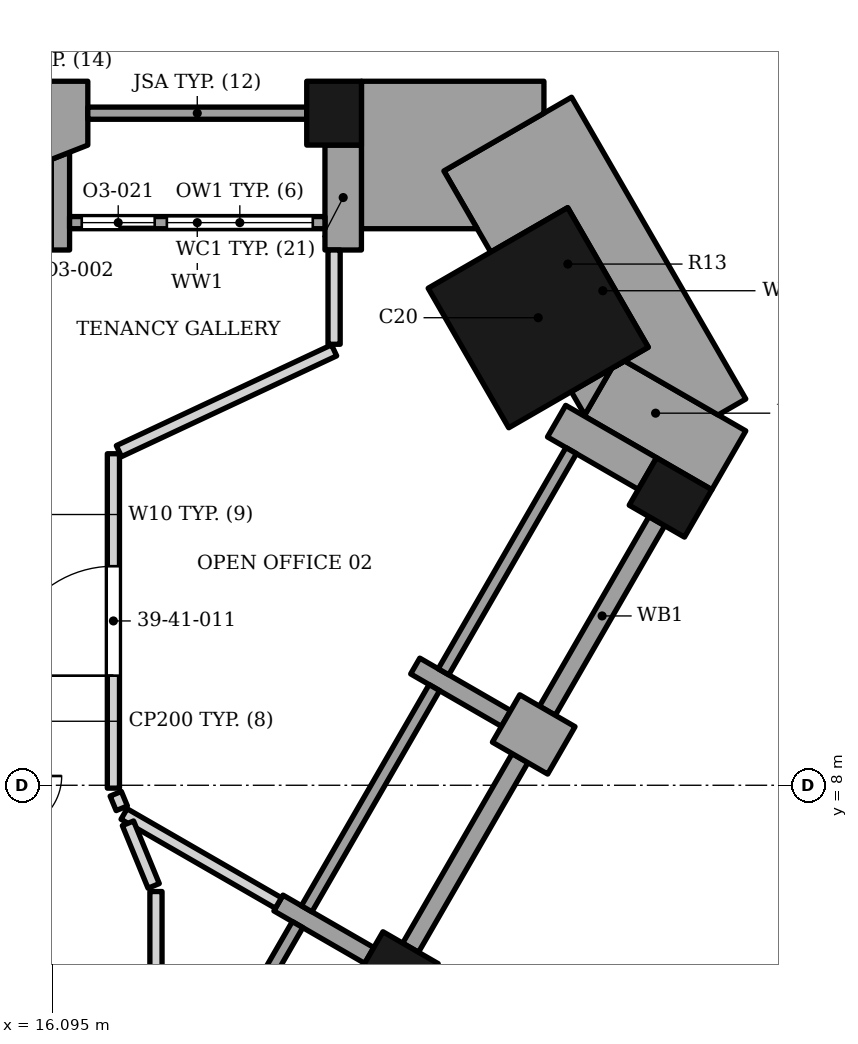
"""IFC4 building model, lengths in metres.
Left out: names, types, materials, properties, quantities, classifications, styles, units other than length and angle.
Written with IfcOpenShell. Run it as: python <this file> out.ifc"""

import sys

from ifc_helpers import new_model, si_unit, direction, frame, frame_2d, origin, origin_2d, place, context, subcontext, project, spatial, polyline, rectangle, outline, extrude, element, fill, save


model = new_model("IFC4")
c1 = context("Model", 3, precision=1e-05, world=origin(), true_north=direction((0.0, 1.0)))
c2 = subcontext(c1, "Body", "Model", "MODEL_VIEW")
j1 = project(units=[si_unit("LENGTHUNIT", "METRE"), si_unit("PLANEANGLEUNIT", "RADIAN")], contexts=[c1])
p1 = place(None, origin())
s1 = spatial("IfcSite", under=j1, at=p1, CompositionType="ELEMENT")
p2 = place(p1, origin())
s2 = spatial("IfcBuilding", under=s1, at=p2, CompositionType="ELEMENT")
p3 = place(p2, frame((0.0, 0.0, 168.0)))
s3 = spatial("IfcBuildingStorey", under=s2, at=p3, CompositionType="ELEMENT", Elevation=168.0)
p4 = place(p3, frame((24.087, 15.689, 0.0), z_axis=(0.0, 0.0, 1.0), x_axis=(-0.866025386331, -0.50000003023, 0.0)))
e1 = element("IfcColumn", 1, at=p4, inside=s3, PredefinedType="COLUMN", context=c2, shape_type="SweptSolid", body=[
    extrude(rectangle(XDim=2.65, YDim=2.65, at=origin_2d()), origin(), (0.0, 0.0, 1.0), 3.9),
])
for number, where, z_axis, x_axis in (
    (2, (21.763, 4.939, 0.0), (0.0, 0.0, 1.0), (0.5, 0.866, 0.0)),
    (3, (26.263, 12.733, 0.0), (0.0, 0.0, 1.0), (0.5, 0.866, 0.0)),
    (4, (20.73, 19.053, 0.0), (0.0, 0.0, 1.0), (-1.0, 0.0, 0.0)),
):
    element("IfcColumn", number, at=place(p3, frame(where, z_axis=z_axis, x_axis=x_axis)), inside=s3, PredefinedType="COLUMN", context=c2, shape_type="SweptSolid", body=[
        extrude(rectangle(XDim=0.9, YDim=1.05, at=origin_2d()), origin(), (0.0, 0.0, 1.0), 3.9),
    ])
p5 = place(p3, frame((19.814, 6.064, 0.0), z_axis=(0.0, 0.0, 1.0), x_axis=(0.866013532718, -0.500020560727, 0.0)))
e5 = element("IfcWall", 5, at=p5, inside=s3, PredefinedType="SOLIDWALL", context=c2, shape_type="SweptSolid", body=[
    extrude(rectangle(XDim=1.725, YDim=0.3, at=frame_2d((0.863, 0.0))), origin(), (0.0, 0.0, 1.0), 2.95),
])
p6 = place(p3, frame((24.468, 8.573, 0.0), z_axis=(0.0, 0.0, 1.0), x_axis=(-0.86592997719, 0.500165247297, 0.0)))
e6 = element("IfcWall", 6, at=p6, inside=s3, PredefinedType="SOLIDWALL", context=c2, shape_type="SweptSolid", body=[
    extrude(rectangle(XDim=1.05, YDim=0.9, at=frame_2d((0.525, 0.0))), origin(), (0.0, 0.0, 1.0), 3.0),
])
p7 = place(p3, frame((23.558, 9.099, 0.0), z_axis=(0.0, 0.0, 1.0), x_axis=(-0.866074815912, 0.499914405916, 0.0)))
e7 = element("IfcWall", 7, at=p7, inside=s3, PredefinedType="SOLIDWALL", context=c2, shape_type="SweptSolid", body=[
    extrude(rectangle(XDim=1.725, YDim=0.3, at=frame_2d((0.862, 0.0))), origin(), (0.0, 0.0, 1.0), 3.0),
])
p8 = place(p3, frame((25.883, 13.125, 0.0), z_axis=(0.0, 0.0, 1.0), x_axis=(-0.866013532718, 0.500020560727, 0.0)))
e8 = element("IfcWall", 8, at=p8, inside=s3, PredefinedType="SOLIDWALL", context=c2, shape_type="SweptSolid", body=[
    extrude(rectangle(XDim=1.725, YDim=0.6, at=frame_2d((0.863, 0.0))), origin(), (0.0, 0.0, 1.0), 3.0),
])
p9 = place(p3, frame((18.029, 2.072, 0.0), z_axis=(0.0, 0.0, 1.0), x_axis=(0.500027713859, 0.866009402589, 0.0)))
e9 = element("IfcWall", 9, at=p9, inside=s3, PredefinedType="ELEMENTEDWALL", context=c2, shape_type="SweptSolid", body=[
    extrude(rectangle(XDim=4.2, YDim=0.2, at=frame_2d((2.1, 0.0))), origin(), (0.0, 0.0, 1.0), 2.95),
])
p10 = place(p3, frame((21.988, 5.329, 0.0), z_axis=(0.0, 0.0, 1.0), x_axis=(0.500012057535, 0.866018442252, 0.0)))
e10 = element("IfcWall", 10, at=p10, inside=s3, PredefinedType="SOLIDWALL", context=c2, shape_type="SweptSolid", body=[
    extrude(rectangle(XDim=3.6, YDim=0.3, at=frame_2d((1.8, 0.0))), origin(), (0.0, 0.0, 1.0), 3.0),
])
p11 = place(p3, frame((20.279, 5.969, 0.0), z_axis=(0.0, 0.0, 1.0), x_axis=(0.500002543286, 0.866023935413, 0.0)))
e11 = element("IfcWall", 11, at=p11, inside=s3, PredefinedType="ELEMENTEDWALL", context=c2, shape_type="SweptSolid", body=[
    extrude(rectangle(XDim=4.2, YDim=0.2, at=frame_2d((2.1, 0.0))), origin(), (0.0, 0.0, 1.0), 3.0),
])
p12 = place(p3, frame((24.238, 9.226, 0.0), z_axis=(0.0, 0.0, 1.0), x_axis=(0.500012057535, 0.866018442252, 0.0)))
e12 = element("IfcWall", 12, at=p12, inside=s3, PredefinedType="SOLIDWALL", context=c2, shape_type="SweptSolid", body=[
    extrude(rectangle(XDim=3.6, YDim=0.3, at=frame_2d((1.8, 0.0))), origin(), (0.0, 0.0, 1.0), 3.0),
])
p13 = place(p3, frame((22.529, 9.866, 0.0), z_axis=(0.0, 0.0, 1.0), x_axis=(0.500027713859, 0.866009402589, 0.0)))
e13 = element("IfcWall", 13, at=p13, inside=s3, PredefinedType="ELEMENTEDWALL", context=c2, shape_type="SweptSolid", body=[
    extrude(rectangle(XDim=4.2, YDim=0.2, at=frame_2d((2.1, 0.0))), origin(), (0.0, 0.0, 1.0), 3.0),
])
p14 = place(p3, origin())
e14 = element("IfcWall", 14, at=p14, inside=s3, PredefinedType="SOLIDWALL", context=c2, shape_type="SweptSolid", body=[
    extrude(outline(polyline([(21.18, 16.802), (21.18, 18.528), (20.58, 18.528), (20.58, 16.802), (21.18, 16.802)])), origin(), (0.0, 0.0, 1.0), 3.0),
])
p15 = place(p3, origin())
e15 = element("IfcWall", 15, at=p15, inside=s3, PredefinedType="SOLIDWALL", context=c2, shape_type="SweptSolid", body=[
    extrude(outline(polyline([(15.6, 18.104), (16.68, 18.528), (16.68, 19.578), (15.78, 19.578), (15.32, 19.052), (15.6, 19.052), (15.6, 18.104)])), origin(), (0.0, 0.0, 1.0), 3.0),
])
p16 = place(p3, origin())
e16 = element("IfcWall", 16, at=p16, inside=s3, PredefinedType="SOLIDWALL", context=c2, shape_type="SweptSolid", body=[
    extrude(outline(polyline([(16.08, 18.292), (16.08, 16.802), (16.38, 16.802), (16.38, 18.41), (16.08, 18.292)])), origin(), (0.0, 0.0, 1.0), 3.0),
])
p17 = place(p3, frame((20.28, 19.052, 0.0), z_axis=(0.0, 0.0, 1.0), x_axis=(-1.0, 0.0, 0.0)))
e17 = element("IfcWall", 17, at=p17, inside=s3, PredefinedType="SOLIDWALL", context=c2, shape_type="SweptSolid", body=[
    extrude(rectangle(XDim=3.6, YDim=0.2, at=frame_2d((1.8, 0.0))), origin(), (0.0, 0.0, 1.0), 3.0),
])
p18 = place(p3, frame((20.58, 17.252, 0.0), z_axis=(0.0, 0.0, 1.0), x_axis=(-1.0, 0.0, 0.0)))
e18 = element("IfcWall", 18, at=p18, inside=s3, PredefinedType="ELEMENTEDWALL", context=c2, shape_type="SweptSolid", body=[
    extrude(rectangle(XDim=4.2, YDim=0.2, at=frame_2d((2.1, 0.0))), origin(), (0.0, 0.0, 1.0), 3.0),
])
p19 = place(p18, frame((0.2, 0.0, 0.45)))
e19 = element("IfcOpeningElement", 19, at=p19, cuts=e18, PredefinedType="OPENING", context=c2, shape_type="SweptSolid", body=[
    extrude(rectangle(XDim=2.4, YDim=2.25, at=frame_2d((1.2, 1.125))), frame((0.0, 0.11, 0.0), z_axis=(0.0, -1.0, 0.0), x_axis=(1.0, 0.0, 0.0)), (0.0, 0.0, 1.0), 0.22),
])
p20 = place(p18, frame((2.8, 0.0, 0.0)))
e20 = element("IfcOpeningElement", 20, at=p20, cuts=e18, PredefinedType="OPENING", context=c2, shape_type="SweptSolid", body=[
    extrude(rectangle(XDim=1.2, YDim=2.7, at=frame_2d((0.6, 1.35))), frame((0.0, 0.11, 0.0), z_axis=(0.0, -1.0, 0.0), x_axis=(1.0, 0.0, 0.0)), (0.0, 0.0, 1.0), 0.22),
])
p21 = place(p3, origin())
e21 = element("IfcWall", 21, at=p21, inside=s3, PredefinedType="SOLIDWALL", context=c2, shape_type="SweptSolid", body=[
    extrude(outline(polyline([(24.843, 14.073), (26.943, 12.86), (27.501, 13.827), (25.507, 14.979), (25.295, 14.856), (24.843, 14.073)])), origin(), (0.0, 0.0, 1.0), 3.0),
])
p22 = place(p3, origin())
e22 = element("IfcWall", 22, at=p22, inside=s3, PredefinedType="SOLIDWALL", context=c2, shape_type="SweptSolid", body=[
    extrude(outline(polyline([(24.852, 14.09), (25.295, 14.856), (24.631, 14.473), (24.852, 14.09)])), origin(), (0.0, 0.0, 1.0), 3.0),
])
p23 = place(p3, origin())
e23 = element("IfcWall", 23, at=p23, inside=s3, PredefinedType="SOLIDWALL", context=c2, shape_type="SweptSolid", body=[
    extrude(outline(polyline([(24.572, 17.499), (25.897, 15.204), (25.344, 14.885), (25.507, 14.979), (27.046, 14.09), (27.501, 14.352), (24.636, 19.315), (22.536, 18.103), (23.306, 16.768), (24.572, 17.499)])), origin(), (0.0, 0.0, 1.0), 3.0),
])
p24 = place(p3, origin())
e24 = element("IfcWall", 24, at=p24, inside=s3, PredefinedType="SOLIDWALL", context=c2, shape_type="SweptSolid", body=[
    extrude(outline(polyline([(21.18, 18.528), (21.18, 17.153), (23.084, 17.153), (22.536, 18.103), (24.181, 19.052), (24.181, 19.578), (21.18, 19.578), (21.18, 18.528), (21.18, 18.528)])), origin(), (0.0, 0.0, 1.0), 3.0),
])
p25 = place(p3, frame((17.276, 7.527, 0.0), z_axis=(0.0, 0.0, 1.0), x_axis=(0.866324259283, -0.499482009464, 0.0)))
e25 = element("IfcWall", 25, at=p25, inside=s3, PredefinedType="PARTITIONING", context=c2, shape_type="SweptSolid", body=[
    extrude(rectangle(XDim=2.93, YDim=0.2, at=frame_2d((1.465, 0.0))), origin(), (0.0, 0.0, 1.0), 3.73),
])
p26 = place(p3, frame((17.8, 3.9, 0.0), z_axis=(0.0, 0.0, 1.0), x_axis=(0.000103755965, 0.999999994617, 0.0)))
e26 = element("IfcWall", 26, at=p26, inside=s3, PredefinedType="PARTITIONING", context=c2, shape_type="SweptSolid", body=[
    extrude(rectangle(XDim=2.353, YDim=0.2, at=frame_2d((1.177, 0.0))), origin(), (0.0, 0.0, 1.0), 2.95),
])
p27 = place(p3, frame((17.34, 7.375, 0.0), z_axis=(0.0, 0.0, 1.0), x_axis=(0.379657440063, -0.925127141643, 0.0)))
e27 = element("IfcWall", 27, at=p27, inside=s3, PredefinedType="PARTITIONING", context=c2, shape_type="SweptSolid", body=[
    extrude(rectangle(XDim=1.113, YDim=0.2, at=frame_2d((0.557, 0.0))), origin(), (0.0, 0.0, 1.0), 3.73),
])
p28 = place(p3, frame((17.139, 7.86, 0.0), z_axis=(0.0, 0.0, 1.0), x_axis=(0.383408069738, -0.923579044836, 0.0)))
e28 = element("IfcWall", 28, at=p28, inside=s3, PredefinedType="PARTITIONING", context=c2, shape_type="SweptSolid", body=[
    extrude(rectangle(XDim=0.259, YDim=0.2, at=frame_2d((0.129, 0.0))), origin(), (0.0, 0.0, 1.0), 3.73),
])
p29 = place(p3, frame((17.101, 7.953, 0.0), z_axis=(0.0, 0.0, 1.0), x_axis=(0.0, 1.0, 0.0)))
e29 = element("IfcWall", 29, at=p29, inside=s3, PredefinedType="PARTITIONING", context=c2, shape_type="SweptSolid", body=[
    extrude(rectangle(XDim=5.5, YDim=0.2, at=frame_2d((2.75, 0.0))), origin(), (0.0, 0.0, 1.0), 3.73),
])
p30 = place(p29, frame((1.85, 0.0, 0.0)))
e30 = element("IfcOpeningElement", 30, at=p30, cuts=e29, PredefinedType="OPENING", context=c2, shape_type="SweptSolid", body=[
    extrude(rectangle(XDim=1.8, YDim=2.4, at=frame_2d((0.9, 1.2))), frame((0.0, 0.11, 0.0), z_axis=(0.0, -1.0, 0.0), x_axis=(1.0, 0.0, 0.0)), (0.0, 0.0, 1.0), 0.22),
])
p31 = place(p3, frame((17.191, 13.495, 0.0), z_axis=(0.0, 0.0, 1.0), x_axis=(0.905591697206, 0.424150536898, 0.0)))
e31 = element("IfcWall", 31, at=p31, inside=s3, PredefinedType="PARTITIONING", context=c2, shape_type="SweptSolid", body=[
    extrude(rectangle(XDim=3.908, YDim=0.2, at=frame_2d((1.954, 0.0))), origin(), (0.0, 0.0, 1.0), 3.73),
])
p32 = place(p3, frame((20.73, 15.252, 0.0), z_axis=(0.0, 0.0, 1.0), x_axis=(0.000157480313, 0.9999999876, 0.0)))
e32 = element("IfcWall", 32, at=p32, inside=s3, PredefinedType="PARTITIONING", context=c2, shape_type="SweptSolid", body=[
    extrude(rectangle(XDim=1.55, YDim=0.2, at=frame_2d((0.775, 0.0))), origin(), (0.0, 0.0, 1.0), 3.73),
])
p33 = place(p19, origin())
e33 = element("IfcWindow", 33, at=p33, inside=s3, PartitioningType="SINGLE_PANEL", PredefinedType="WINDOW", context=c2, shape_type="SweptSolid", body=[
    extrude(rectangle(XDim=2.4, YDim=2.25, at=frame_2d((1.2, 1.125))), frame((0.0, 0.03, 0.0), z_axis=(0.0, -1.0, 0.0), x_axis=(1.0, 0.0, 0.0)), (0.0, 0.0, 1.0), 0.06),
])
fill(e19, e33)
p34 = place(p20, origin())
e34 = element("IfcDoor", 34, at=p34, inside=s3, OperationType="SINGLE_SWING_LEFT", PredefinedType="DOOR", context=c2, shape_type="SweptSolid", body=[
    extrude(rectangle(XDim=1.2, YDim=2.7, at=frame_2d((0.6, 1.35))), frame((0.0, 0.025, 0.0), z_axis=(0.0, -1.0, 0.0), x_axis=(1.0, 0.0, 0.0)), (0.0, 0.0, 1.0), 0.05),
])
fill(e20, e34)
p35 = place(p30, origin())
e35 = element("IfcDoor", 35, at=p35, inside=s3, OperationType="DOUBLE_DOOR_SINGLE_SWING", PredefinedType="DOOR", context=c2, shape_type="SweptSolid", body=[
    extrude(rectangle(XDim=1.8, YDim=2.4, at=frame_2d((0.9, 1.2))), frame((0.0, 0.025, 0.0), z_axis=(0.0, -1.0, 0.0), x_axis=(1.0, 0.0, 0.0)), (0.0, 0.0, 1.0), 0.05),
])
fill(e30, e35)
save(model, sys.argv[1])
